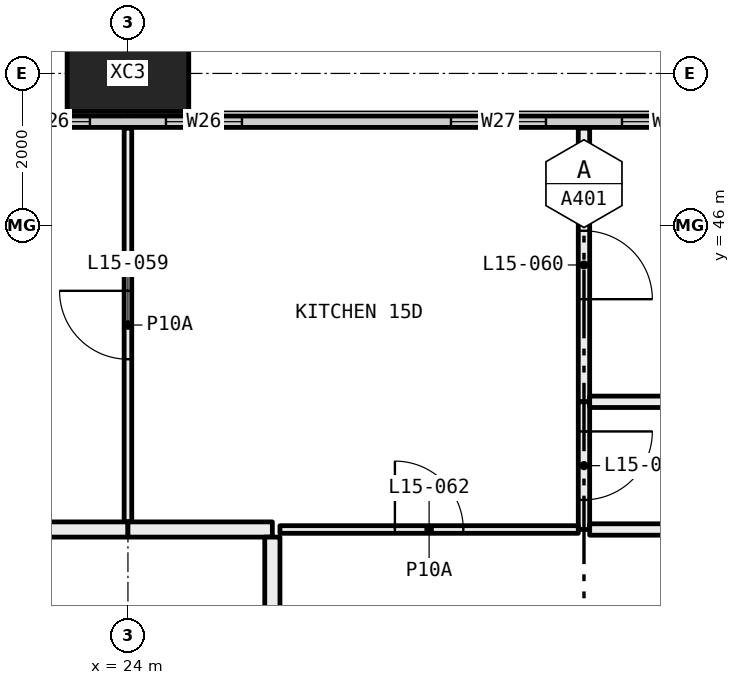
"""IFC4 building model, lengths in metres.
Left out: names, types, materials, properties, quantities, classifications, styles, units other than length and angle.
Written with IfcOpenShell. Run it as: python <this file> out.ifc"""

import sys

from ifc_helpers import new_model, si_unit, direction, frame, frame_2d, origin, origin_2d, place, context, subcontext, project, spatial, rectangle, hollow_rectangle, extrude, element, fill, save


model = new_model("IFC4")
c1 = context("Model", 3, precision=1e-05, world=origin(), true_north=direction((0.0, 1.0)))
c2 = subcontext(c1, "Body", "Model", "MODEL_VIEW")
j1 = project(units=[si_unit("LENGTHUNIT", "METRE"), si_unit("PLANEANGLEUNIT", "RADIAN")], contexts=[c1])
p1 = place(None, origin())
s1 = spatial("IfcSite", under=j1, at=p1, CompositionType="ELEMENT")
p2 = place(p1, origin())
s2 = spatial("IfcBuilding", under=s1, at=p2, CompositionType="ELEMENT")
p3 = place(p2, frame((0.0, 0.0, 64.5)))
s3 = spatial("IfcBuildingStorey", under=s2, at=p3, CompositionType="ELEMENT", Elevation=64.5)
p4 = place(p3, frame((24.0, 48.0, -0.4), z_axis=(0.0, 0.0, 1.0), x_axis=(1.0, 0.0, 0.0)))
e1 = element("IfcColumn", 1, at=p4, inside=s3, PredefinedType="COLUMN", context=c2, shape_type="SweptSolid", body=[
    extrude(hollow_rectangle(XDim=1.6, YDim=1.0, WallThickness=0.065, at=origin_2d()), origin(), (0.0, 0.0, 1.0), 3.45),
])
p5 = place(p3, frame((6.56, 47.365, 0.0), z_axis=(0.0, 0.0, 1.0), x_axis=(1.0, 0.0, 0.0)))
e2 = element("IfcWall", 2, at=p5, inside=s3, PredefinedType="ELEMENTEDWALL", context=c2, shape_type="SweptSolid", body=[
    extrude(rectangle(XDim=58.88, YDim=0.15, at=frame_2d((29.44, 0.0))), origin(), (0.0, 0.0, 1.0), 3.05),
])
p6 = place(p5, frame((0.44, 0.0, 0.45)))
e3 = element("IfcOpeningElement", 3, at=p6, cuts=e2, PredefinedType="OPENING", context=c2, shape_type="SweptSolid", body=[
    extrude(rectangle(XDim=4.5, YDim=2.55, at=frame_2d((2.25, 1.275))), frame((0.0, 0.085, 0.0), z_axis=(0.0, -1.0, 0.0), x_axis=(1.0, 0.0, 0.0)), (0.0, 0.0, 1.0), 0.17),
])
p7 = place(p5, frame((5.94, 0.0, 0.45)))
e4 = element("IfcOpeningElement", 4, at=p7, cuts=e2, PredefinedType="OPENING", context=c2, shape_type="SweptSolid", body=[
    extrude(rectangle(XDim=1.0, YDim=2.55, at=frame_2d((0.5, 1.275))), frame((0.0, 0.085, 0.0), z_axis=(0.0, -1.0, 0.0), x_axis=(1.0, 0.0, 0.0)), (0.0, 0.0, 1.0), 0.17),
])
p8 = place(p5, frame((9.69, 0.0, 0.45)))
e5 = element("IfcOpeningElement", 5, at=p8, cuts=e2, PredefinedType="OPENING", context=c2, shape_type="SweptSolid", body=[
    extrude(rectangle(XDim=1.25, YDim=2.55, at=frame_2d((0.625, 1.275))), frame((0.0, 0.085, 0.0), z_axis=(0.0, -1.0, 0.0), x_axis=(1.0, 0.0, 0.0)), (0.0, 0.0, 1.0), 0.17),
])
p9 = place(p5, frame((11.94, 0.0, 0.45)))
e6 = element("IfcOpeningElement", 6, at=p9, cuts=e2, PredefinedType="OPENING", context=c2, shape_type="SweptSolid", body=[
    extrude(rectangle(XDim=1.25, YDim=2.55, at=frame_2d((0.625, 1.275))), frame((0.0, 0.085, 0.0), z_axis=(0.0, -1.0, 0.0), x_axis=(1.0, 0.0, 0.0)), (0.0, 0.0, 1.0), 0.17),
])
p10 = place(p5, frame((15.94, 0.0, 0.45)))
e7 = element("IfcOpeningElement", 7, at=p10, cuts=e2, PredefinedType="OPENING", context=c2, shape_type="SweptSolid", body=[
    extrude(rectangle(XDim=1.0, YDim=2.55, at=frame_2d((0.5, 1.275))), frame((0.0, 0.085, 0.0), z_axis=(0.0, -1.0, 0.0), x_axis=(1.0, 0.0, 0.0)), (0.0, 0.0, 1.0), 0.17),
])
p11 = place(p5, frame((17.94, 0.0, 0.45)))
e8 = element("IfcOpeningElement", 8, at=p11, cuts=e2, PredefinedType="OPENING", context=c2, shape_type="SweptSolid", body=[
    extrude(rectangle(XDim=1.0, YDim=2.55, at=frame_2d((0.5, 1.275))), frame((0.0, 0.085, 0.0), z_axis=(0.0, -1.0, 0.0), x_axis=(1.0, 0.0, 0.0)), (0.0, 0.0, 1.0), 0.17),
])
p12 = place(p5, frame((21.69, 0.0, 0.45)))
e9 = element("IfcOpeningElement", 9, at=p12, cuts=e2, PredefinedType="OPENING", context=c2, shape_type="SweptSolid", body=[
    extrude(rectangle(XDim=1.25, YDim=2.55, at=frame_2d((0.625, 1.275))), frame((0.0, 0.085, 0.0), z_axis=(0.0, -1.0, 0.0), x_axis=(1.0, 0.0, 0.0)), (0.0, 0.0, 1.0), 0.17),
])
p13 = place(p5, frame((23.94, 0.0, 0.45)))
e10 = element("IfcOpeningElement", 10, at=p13, cuts=e2, PredefinedType="OPENING", context=c2, shape_type="SweptSolid", body=[
    extrude(rectangle(XDim=1.25, YDim=2.55, at=frame_2d((0.625, 1.275))), frame((0.0, 0.085, 0.0), z_axis=(0.0, -1.0, 0.0), x_axis=(1.0, 0.0, 0.0)), (0.0, 0.0, 1.0), 0.17),
])
p14 = place(p5, frame((27.94, 0.0, 0.45)))
e11 = element("IfcOpeningElement", 11, at=p14, cuts=e2, PredefinedType="OPENING", context=c2, shape_type="SweptSolid", body=[
    extrude(rectangle(XDim=1.0, YDim=2.55, at=frame_2d((0.5, 1.275))), frame((0.0, 0.085, 0.0), z_axis=(0.0, -1.0, 0.0), x_axis=(1.0, 0.0, 0.0)), (0.0, 0.0, 1.0), 0.17),
])
p15 = place(p5, frame((29.94, 0.0, 0.45)))
e12 = element("IfcOpeningElement", 12, at=p15, cuts=e2, PredefinedType="OPENING", context=c2, shape_type="SweptSolid", body=[
    extrude(rectangle(XDim=1.0, YDim=2.55, at=frame_2d((0.5, 1.275))), frame((0.0, 0.085, 0.0), z_axis=(0.0, -1.0, 0.0), x_axis=(1.0, 0.0, 0.0)), (0.0, 0.0, 1.0), 0.17),
])
p16 = place(p5, frame((33.69, 0.0, 0.45)))
e13 = element("IfcOpeningElement", 13, at=p16, cuts=e2, PredefinedType="OPENING", context=c2, shape_type="SweptSolid", body=[
    extrude(rectangle(XDim=1.25, YDim=2.55, at=frame_2d((0.625, 1.275))), frame((0.0, 0.085, 0.0), z_axis=(0.0, -1.0, 0.0), x_axis=(1.0, 0.0, 0.0)), (0.0, 0.0, 1.0), 0.17),
])
p17 = place(p5, frame((35.94, 0.0, 0.45)))
e14 = element("IfcOpeningElement", 14, at=p17, cuts=e2, PredefinedType="OPENING", context=c2, shape_type="SweptSolid", body=[
    extrude(rectangle(XDim=1.25, YDim=2.55, at=frame_2d((0.625, 1.275))), frame((0.0, 0.085, 0.0), z_axis=(0.0, -1.0, 0.0), x_axis=(1.0, 0.0, 0.0)), (0.0, 0.0, 1.0), 0.17),
])
p18 = place(p5, frame((39.94, 0.0, 0.45)))
e15 = element("IfcOpeningElement", 15, at=p18, cuts=e2, PredefinedType="OPENING", context=c2, shape_type="SweptSolid", body=[
    extrude(rectangle(XDim=1.0, YDim=2.55, at=frame_2d((0.5, 1.275))), frame((0.0, 0.085, 0.0), z_axis=(0.0, -1.0, 0.0), x_axis=(1.0, 0.0, 0.0)), (0.0, 0.0, 1.0), 0.17),
])
p19 = place(p5, frame((41.94, 0.0, 0.45)))
e16 = element("IfcOpeningElement", 16, at=p19, cuts=e2, PredefinedType="OPENING", context=c2, shape_type="SweptSolid", body=[
    extrude(rectangle(XDim=1.0, YDim=2.55, at=frame_2d((0.5, 1.275))), frame((0.0, 0.085, 0.0), z_axis=(0.0, -1.0, 0.0), x_axis=(1.0, 0.0, 0.0)), (0.0, 0.0, 1.0), 0.17),
])
p20 = place(p5, frame((45.69, 0.0, 0.45)))
e17 = element("IfcOpeningElement", 17, at=p20, cuts=e2, PredefinedType="OPENING", context=c2, shape_type="SweptSolid", body=[
    extrude(rectangle(XDim=1.25, YDim=2.55, at=frame_2d((0.625, 1.275))), frame((0.0, 0.085, 0.0), z_axis=(0.0, -1.0, 0.0), x_axis=(1.0, 0.0, 0.0)), (0.0, 0.0, 1.0), 0.17),
])
p21 = place(p5, frame((47.94, 0.0, 0.45)))
e18 = element("IfcOpeningElement", 18, at=p21, cuts=e2, PredefinedType="OPENING", context=c2, shape_type="SweptSolid", body=[
    extrude(rectangle(XDim=1.25, YDim=2.55, at=frame_2d((0.625, 1.275))), frame((0.0, 0.085, 0.0), z_axis=(0.0, -1.0, 0.0), x_axis=(1.0, 0.0, 0.0)), (0.0, 0.0, 1.0), 0.17),
])
p22 = place(p5, frame((51.94, 0.0, 0.45)))
e19 = element("IfcOpeningElement", 19, at=p22, cuts=e2, PredefinedType="OPENING", context=c2, shape_type="SweptSolid", body=[
    extrude(rectangle(XDim=1.0, YDim=2.55, at=frame_2d((0.5, 1.275))), frame((0.0, 0.085, 0.0), z_axis=(0.0, -1.0, 0.0), x_axis=(1.0, 0.0, 0.0)), (0.0, 0.0, 1.0), 0.17),
])
p23 = place(p5, frame((53.94, 0.0, 0.45)))
e20 = element("IfcOpeningElement", 20, at=p23, cuts=e2, PredefinedType="OPENING", context=c2, shape_type="SweptSolid", body=[
    extrude(rectangle(XDim=4.5, YDim=2.55, at=frame_2d((2.25, 1.275))), frame((0.0, 0.085, 0.0), z_axis=(0.0, -1.0, 0.0), x_axis=(1.0, 0.0, 0.0)), (0.0, 0.0, 1.0), 0.17),
])
p24 = place(p3, frame((24.0, 42.1, 0.0), z_axis=(0.0, 0.0, 1.0), x_axis=(0.0, 1.0, 0.0)))
e21 = element("IfcWall", 21, at=p24, inside=s3, PredefinedType="PARTITIONING", context=c2, shape_type="SweptSolid", body=[
    extrude(rectangle(XDim=5.18, YDim=0.1, at=frame_2d((2.59, 0.0))), origin(), (0.0, 0.0, 1.0), 3.05),
])
p25 = place(p24, frame((2.14, 0.0, 0.0)))
e22 = element("IfcOpeningElement", 22, at=p25, cuts=e21, PredefinedType="OPENING", context=c2, shape_type="SweptSolid", body=[
    extrude(rectangle(XDim=0.9, YDim=2.1, at=frame_2d((0.45, 1.05))), frame((0.0, 0.06, 0.0), z_axis=(0.0, -1.0, 0.0), x_axis=(1.0, 0.0, 0.0)), (0.0, 0.0, 1.0), 0.12),
])
p26 = place(p3, frame((18.0, 42.0, 0.0), z_axis=(0.0, 0.0, 1.0), x_axis=(1.0, 0.0, 0.0)))
e23 = element("IfcWall", 23, at=p26, inside=s3, PredefinedType="PARTITIONING", context=c2, shape_type="SweptSolid", body=[
    extrude(rectangle(XDim=6.0, YDim=0.2, at=frame_2d((3.0, 0.0))), origin(), (0.0, 0.0, 1.0), 3.05),
])
p27 = place(p3, frame((30.0, 43.68, 0.0), z_axis=(0.0, 0.0, 1.0), x_axis=(0.0, 1.0, 0.0)))
e24 = element("IfcWall", 24, at=p27, inside=s3, PredefinedType="PARTITIONING", context=c2, shape_type="SweptSolid", body=[
    extrude(rectangle(XDim=3.6, YDim=0.15, at=frame_2d((1.8, 0.0))), origin(), (0.0, 0.0, 1.0), 3.05),
])
p28 = place(p27, frame((1.35, 0.0, 0.0)))
e25 = element("IfcOpeningElement", 25, at=p28, cuts=e24, PredefinedType="OPENING", context=c2, shape_type="SweptSolid", body=[
    extrude(rectangle(XDim=0.9, YDim=2.1, at=frame_2d((0.45, 1.05))), frame((0.0, 0.085, 0.0), z_axis=(0.0, -1.0, 0.0), x_axis=(1.0, 0.0, 0.0)), (0.0, 0.0, 1.0), 0.17),
])
p29 = place(p3, frame((30.0, 42.0, 0.0), z_axis=(0.0, 0.0, 1.0), x_axis=(0.0, 1.0, 0.0)))
e26 = element("IfcWall", 26, at=p29, inside=s3, PredefinedType="PARTITIONING", context=c2, shape_type="SweptSolid", body=[
    extrude(rectangle(XDim=1.68, YDim=0.15, at=frame_2d((0.84, 0.0))), origin(), (0.0, 0.0, 1.0), 3.05),
])
p30 = place(p29, frame((0.39, 0.0, 0.0)))
e27 = element("IfcOpeningElement", 27, at=p30, cuts=e26, PredefinedType="OPENING", context=c2, shape_type="SweptSolid", body=[
    extrude(rectangle(XDim=0.9, YDim=2.1, at=frame_2d((0.45, 1.05))), frame((0.0, 0.085, 0.0), z_axis=(0.0, -1.0, 0.0), x_axis=(1.0, 0.0, 0.0)), (0.0, 0.0, 1.0), 0.17),
])
p31 = place(p3, frame((26.0, 42.0, 0.0), z_axis=(0.0, 0.0, 1.0), x_axis=(1.0, 0.0, 0.0)))
e28 = element("IfcWall", 28, at=p31, inside=s3, PredefinedType="PARTITIONING", context=c2, shape_type="SweptSolid", body=[
    extrude(rectangle(XDim=3.925, YDim=0.1, at=frame_2d((1.962, 0.0))), origin(), (0.0, 0.0, 1.0), 3.05),
])
p32 = place(p31, frame((1.512, 0.0, 0.0)))
e29 = element("IfcOpeningElement", 29, at=p32, cuts=e28, PredefinedType="OPENING", context=c2, shape_type="SweptSolid", body=[
    extrude(rectangle(XDim=0.9, YDim=2.1, at=frame_2d((0.45, 1.05))), frame((0.0, 0.06, 0.0), z_axis=(0.0, -1.0, 0.0), x_axis=(1.0, 0.0, 0.0)), (0.0, 0.0, 1.0), 0.12),
])
p33 = place(p3, frame((24.0, 42.0, 0.0), z_axis=(0.0, 0.0, 1.0), x_axis=(1.0, 0.0, 0.0)))
e30 = element("IfcWall", 30, at=p33, inside=s3, PredefinedType="PARTITIONING", context=c2, shape_type="SweptSolid", body=[
    extrude(rectangle(XDim=1.9, YDim=0.2, at=frame_2d((0.95, 0.0))), origin(), (0.0, 0.0, 1.0), 3.05),
])
p34 = place(p3, frame((30.075, 43.68, 0.0), z_axis=(0.0, 0.0, 1.0), x_axis=(1.0, 0.0, 0.0)))
e31 = element("IfcWall", 31, at=p34, inside=s3, PredefinedType="PARTITIONING", context=c2, shape_type="SweptSolid", body=[
    extrude(rectangle(XDim=5.925, YDim=0.15, at=frame_2d((2.962, 0.0))), origin(), (0.0, 0.0, 1.0), 2.45),
])
p35 = place(p3, frame((30.075, 42.0, 0.0), z_axis=(0.0, 0.0, 1.0), x_axis=(1.0, 0.0, 0.0)))
e32 = element("IfcWall", 32, at=p35, inside=s3, PredefinedType="PARTITIONING", context=c2, shape_type="SweptSolid", body=[
    extrude(rectangle(XDim=1.425, YDim=0.15, at=frame_2d((0.712, 0.0))), origin(), (0.0, 0.0, 1.0), 3.05),
])
p36 = place(p3, frame((25.9, 41.9, 0.0), z_axis=(0.0, 0.0, 1.0), x_axis=(0.0, -1.0, 0.0)))
e33 = element("IfcWall", 33, at=p36, inside=s3, PredefinedType="PARTITIONING", context=c2, shape_type="SweptSolid", body=[
    extrude(rectangle(XDim=6.2, YDim=0.2, at=frame_2d((3.1, 0.0))), origin(), (0.0, 0.0, 1.0), 2.45),
])
p37 = place(p10, origin())
e34 = element("IfcWindow", 34, at=p37, inside=s3, PartitioningType="SINGLE_PANEL", PredefinedType="WINDOW", context=c2, shape_type="SweptSolid", body=[
    extrude(rectangle(XDim=1.0, YDim=2.55, at=frame_2d((0.5, 1.275))), frame((0.0, 0.03, 0.0), z_axis=(0.0, -1.0, 0.0), x_axis=(1.0, 0.0, 0.0)), (0.0, 0.0, 1.0), 0.06),
])
fill(e7, e34)
p38 = place(p11, origin())
e35 = element("IfcWindow", 35, at=p38, inside=s3, PartitioningType="SINGLE_PANEL", PredefinedType="WINDOW", context=c2, shape_type="SweptSolid", body=[
    extrude(rectangle(XDim=1.0, YDim=2.55, at=frame_2d((0.5, 1.275))), frame((0.0, 0.03, 0.0), z_axis=(0.0, -1.0, 0.0), x_axis=(1.0, 0.0, 0.0)), (0.0, 0.0, 1.0), 0.06),
])
fill(e8, e35)
p39 = place(p12, origin())
e36 = element("IfcWindow", 36, at=p39, inside=s3, PartitioningType="SINGLE_PANEL", PredefinedType="WINDOW", context=c2, shape_type="SweptSolid", body=[
    extrude(rectangle(XDim=1.25, YDim=2.55, at=frame_2d((0.625, 1.275))), frame((0.0, 0.03, 0.0), z_axis=(0.0, -1.0, 0.0), x_axis=(1.0, 0.0, 0.0)), (0.0, 0.0, 1.0), 0.06),
])
fill(e9, e36)
p40 = place(p13, origin())
e37 = element("IfcWindow", 37, at=p40, inside=s3, PartitioningType="SINGLE_PANEL", PredefinedType="WINDOW", context=c2, shape_type="SweptSolid", body=[
    extrude(rectangle(XDim=1.25, YDim=2.55, at=frame_2d((0.625, 1.275))), frame((0.0, 0.03, 0.0), z_axis=(0.0, -1.0, 0.0), x_axis=(1.0, 0.0, 0.0)), (0.0, 0.0, 1.0), 0.06),
])
fill(e10, e37)
p41 = place(p25, origin())
e38 = element("IfcDoor", 38, at=p41, inside=s3, OperationType="SINGLE_SWING_LEFT", PredefinedType="DOOR", context=c2, shape_type="SweptSolid", body=[
    extrude(rectangle(XDim=0.9, YDim=2.1, at=frame_2d((0.45, 1.05))), frame((0.0, 0.025, 0.0), z_axis=(0.0, -1.0, 0.0), x_axis=(1.0, 0.0, 0.0)), (0.0, 0.0, 1.0), 0.05),
])
fill(e22, e38)
p42 = place(p28, frame((0.9, 0.0, 0.0), x_axis=(-1.0, 0.0, 0.0)))
e39 = element("IfcDoor", 39, at=p42, inside=s3, OperationType="SINGLE_SWING_LEFT", PredefinedType="DOOR", context=c2, shape_type="SweptSolid", body=[
    extrude(rectangle(XDim=0.9, YDim=2.1, at=frame_2d((0.45, 1.05))), frame((0.0, 0.025, 0.0), z_axis=(0.0, -1.0, 0.0), x_axis=(1.0, 0.0, 0.0)), (0.0, 0.0, 1.0), 0.05),
])
fill(e25, e39)
p43 = place(p30, frame((0.9, 0.0, 0.0), x_axis=(-1.0, 0.0, 0.0)))
e40 = element("IfcDoor", 40, at=p43, inside=s3, OperationType="SINGLE_SWING_RIGHT", PredefinedType="DOOR", context=c2, shape_type="SweptSolid", body=[
    extrude(rectangle(XDim=0.9, YDim=2.1, at=frame_2d((0.45, 1.05))), frame((0.0, 0.025, 0.0), z_axis=(0.0, -1.0, 0.0), x_axis=(1.0, 0.0, 0.0)), (0.0, 0.0, 1.0), 0.05),
])
fill(e27, e40)
p44 = place(p32, origin())
e41 = element("IfcDoor", 41, at=p44, inside=s3, OperationType="SINGLE_SWING_RIGHT", PredefinedType="DOOR", context=c2, shape_type="SweptSolid", body=[
    extrude(rectangle(XDim=0.9, YDim=2.1, at=frame_2d((0.45, 1.05))), frame((0.0, 0.025, 0.0), z_axis=(0.0, -1.0, 0.0), x_axis=(1.0, 0.0, 0.0)), (0.0, 0.0, 1.0), 0.05),
])
fill(e29, e41)
save(model, sys.argv[1])
